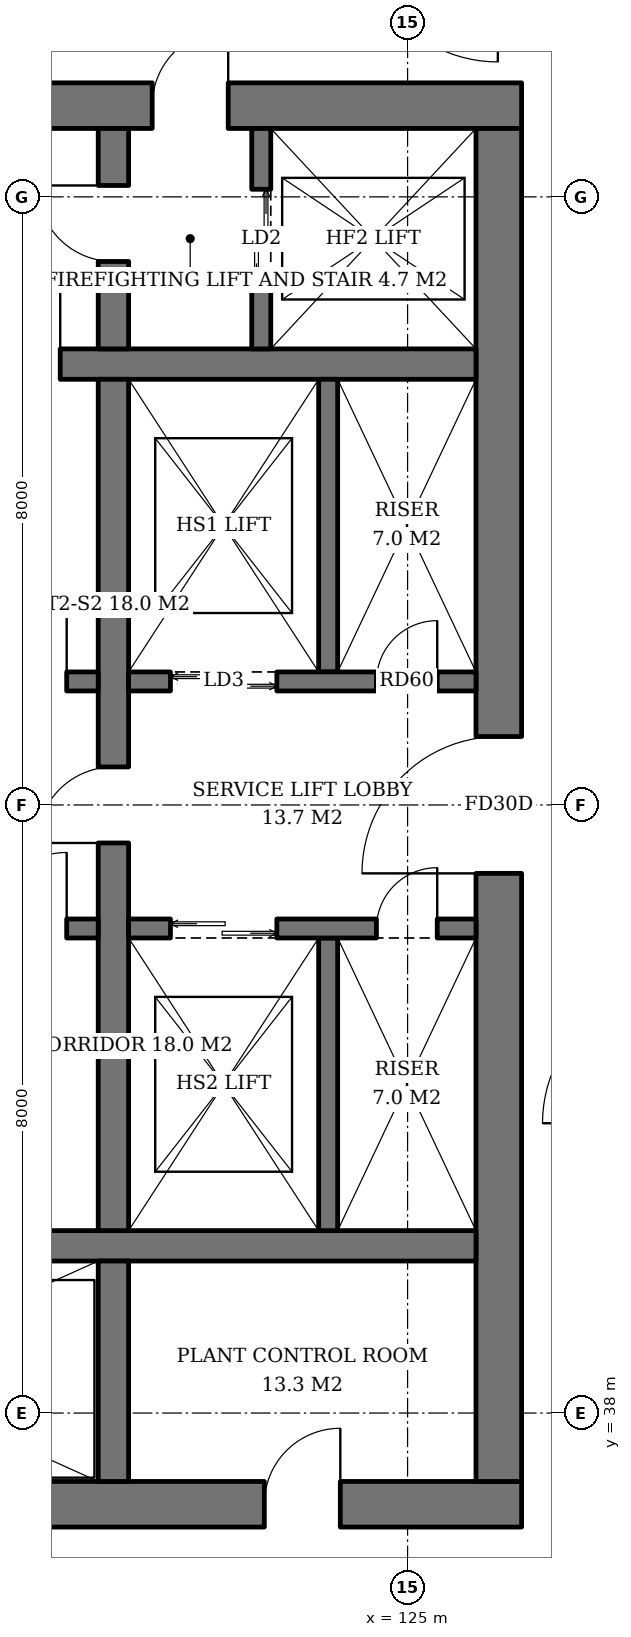
"""IFC4 building model, lengths in metres.
Left out: names, types, materials, properties, quantities, classifications, styles, units other than length and angle.
Written with IfcOpenShell. Run it as: python <this file> out.ifc"""

import sys

from ifc_helpers import new_model, si_unit, direction, frame, frame_2d, origin, place, context, subcontext, project, spatial, rectangle, extrude, element, fill, save


model = new_model("IFC4")
c1 = context("Model", 3, precision=1e-05, world=origin(), true_north=direction((0.0, 1.0)))
c2 = subcontext(c1, "Body", "Model", "MODEL_VIEW")
j1 = project(units=[si_unit("LENGTHUNIT", "METRE"), si_unit("PLANEANGLEUNIT", "RADIAN")], contexts=[c1])
p1 = place(None, origin())
s1 = spatial("IfcSite", under=j1, at=p1, CompositionType="ELEMENT")
p2 = place(p1, origin())
s2 = spatial("IfcBuilding", under=s1, at=p2, CompositionType="ELEMENT")
p3 = place(p2, frame((0.0, 0.0, 81.8)))
s3 = spatial("IfcBuildingStorey", under=s2, at=p3, CompositionType="ELEMENT", Elevation=81.8)
p4 = place(p3, frame((107.5, 36.8, 0.0), z_axis=(0.0, 0.0, 1.0), x_axis=(1.0, 0.0, 0.0)))
e1 = element("IfcWall", 1, at=p4, inside=s3, PredefinedType="SHEAR", context=c2, shape_type="SweptSolid", body=[
    extrude(rectangle(XDim=19.0, YDim=0.6, at=frame_2d((9.5, 0.0))), origin(), (0.0, 0.0, 1.0), 3.8),
])
p5 = place(p4, frame((3.9, 0.0, 0.0)))
e2 = element("IfcOpeningElement", 2, at=p5, cuts=e1, PredefinedType="OPENING", context=c2, shape_type="SweptSolid", body=[
    extrude(rectangle(XDim=1.0, YDim=2.1, at=frame_2d((0.5, 1.05))), frame((0.0, 0.31, 0.0), z_axis=(0.0, -1.0, 0.0), x_axis=(1.0, 0.0, 0.0)), (0.0, 0.0, 1.0), 0.62),
])
p6 = place(p4, frame((15.615, 0.0, 0.0)))
e3 = element("IfcOpeningElement", 3, at=p6, cuts=e1, PredefinedType="OPENING", context=c2, shape_type="SweptSolid", body=[
    extrude(rectangle(XDim=1.0, YDim=2.1, at=frame_2d((0.5, 1.05))), frame((0.0, 0.31, 0.0), z_axis=(0.0, -1.0, 0.0), x_axis=(1.0, 0.0, 0.0)), (0.0, 0.0, 1.0), 0.62),
])
p7 = place(p3, frame((107.5, 55.2, 0.0), z_axis=(0.0, 0.0, 1.0), x_axis=(1.0, 0.0, 0.0)))
e4 = element("IfcWall", 4, at=p7, inside=s3, PredefinedType="SHEAR", context=c2, shape_type="SweptSolid", body=[
    extrude(rectangle(XDim=19.0, YDim=0.6, at=frame_2d((9.5, 0.0))), origin(), (0.0, 0.0, 1.0), 3.8),
])
p8 = place(p7, frame((14.14, 0.0, 0.0)))
e5 = element("IfcOpeningElement", 5, at=p8, cuts=e4, PredefinedType="OPENING", context=c2, shape_type="SweptSolid", body=[
    extrude(rectangle(XDim=1.0, YDim=2.1, at=frame_2d((0.5, 1.05))), frame((0.0, 0.31, 0.0), z_axis=(0.0, -1.0, 0.0), x_axis=(1.0, 0.0, 0.0)), (0.0, 0.0, 1.0), 0.62),
])
p9 = place(p7, frame((1.675, 0.0, 0.0)))
e6 = element("IfcOpeningElement", 6, at=p9, cuts=e4, PredefinedType="OPENING", context=c2, shape_type="SweptSolid", body=[
    extrude(rectangle(XDim=1.0, YDim=2.1, at=frame_2d((0.5, 1.05))), frame((0.0, 0.31, 0.0), z_axis=(0.0, -1.0, 0.0), x_axis=(1.0, 0.0, 0.0)), (0.0, 0.0, 1.0), 0.62),
])
p10 = place(p7, frame((3.587, 0.0, 0.0)))
e7 = element("IfcOpeningElement", 7, at=p10, cuts=e4, PredefinedType="OPENING", context=c2, shape_type="SweptSolid", body=[
    extrude(rectangle(XDim=1.0, YDim=2.1, at=frame_2d((0.5, 1.05))), frame((0.0, 0.31, 0.0), z_axis=(0.0, -1.0, 0.0), x_axis=(1.0, 0.0, 0.0)), (0.0, 0.0, 1.0), 0.62),
])
p11 = place(p3, frame((126.2, 37.1, 0.0), z_axis=(0.0, 0.0, 1.0), x_axis=(0.0, 1.0, 0.0)))
e8 = element("IfcWall", 8, at=p11, inside=s3, PredefinedType="SHEAR", context=c2, shape_type="SweptSolid", body=[
    extrude(rectangle(XDim=17.8, YDim=0.6, at=frame_2d((8.9, 0.0))), origin(), (0.0, 0.0, 1.0), 3.8),
])
p12 = place(p11, frame((8.0, 0.0, 0.0)))
e9 = element("IfcOpeningElement", 9, at=p12, cuts=e8, PredefinedType="OPENING", context=c2, shape_type="SweptSolid", body=[
    extrude(rectangle(XDim=1.8, YDim=2.4, at=frame_2d((0.9, 1.2))), frame((0.0, 0.31, 0.0), z_axis=(0.0, -1.0, 0.0), x_axis=(1.0, 0.0, 0.0)), (0.0, 0.0, 1.0), 0.62),
])
p13 = place(p3, frame((108.1, 40.2, 0.0), z_axis=(0.0, 0.0, 1.0), x_axis=(1.0, 0.0, 0.0)))
e10 = element("IfcWall", 10, at=p13, inside=s3, PredefinedType="SHEAR", context=c2, shape_type="SweptSolid", body=[
    extrude(rectangle(XDim=17.8, YDim=0.4, at=frame_2d((8.9, 0.0))), origin(), (0.0, 0.0, 1.0), 3.8),
])
p14 = place(p13, frame((3.3, 0.0, 0.0)))
e11 = element("IfcOpeningElement", 11, at=p14, cuts=e10, PredefinedType="OPENING", context=c2, shape_type="SweptSolid", body=[
    extrude(rectangle(XDim=1.0, YDim=2.1, at=frame_2d((0.5, 1.05))), frame((0.0, 0.21, 0.0), z_axis=(0.0, -1.0, 0.0), x_axis=(1.0, 0.0, 0.0)), (0.0, 0.0, 1.0), 0.42),
])
p15 = place(p3, frame((108.1, 51.8, 0.0), z_axis=(0.0, 0.0, 1.0), x_axis=(1.0, 0.0, 0.0)))
e12 = element("IfcWall", 12, at=p15, inside=s3, PredefinedType="SHEAR", context=c2, shape_type="SweptSolid", body=[
    extrude(rectangle(XDim=17.8, YDim=0.4, at=frame_2d((8.9, 0.0))), origin(), (0.0, 0.0, 1.0), 3.8),
])
p16 = place(p15, frame((11.33, 0.0, 0.0)))
e13 = element("IfcOpeningElement", 13, at=p16, cuts=e12, PredefinedType="OPENING", context=c2, shape_type="SweptSolid", body=[
    extrude(rectangle(XDim=1.0, YDim=2.1, at=frame_2d((0.5, 1.05))), frame((0.0, 0.21, 0.0), z_axis=(0.0, -1.0, 0.0), x_axis=(1.0, 0.0, 0.0)), (0.0, 0.0, 1.0), 0.42),
])
p17 = place(p3, frame((121.13, 37.1, 0.0), z_axis=(0.0, 0.0, 1.0), x_axis=(0.0, 1.0, 0.0)))
e14 = element("IfcWall", 14, at=p17, inside=s3, PredefinedType="SHEAR", context=c2, shape_type="SweptSolid", body=[
    extrude(rectangle(XDim=2.9, YDim=0.4, at=frame_2d((1.45, 0.0))), origin(), (0.0, 0.0, 1.0), 3.8),
])
p18 = place(p3, frame((121.13, 40.4, 0.0), z_axis=(0.0, 0.0, 1.0), x_axis=(0.0, 1.0, 0.0)))
e15 = element("IfcWall", 15, at=p18, inside=s3, PredefinedType="SHEAR", context=c2, shape_type="SweptSolid", body=[
    extrude(rectangle(XDim=11.2, YDim=0.4, at=frame_2d((5.6, 0.0))), origin(), (0.0, 0.0, 1.0), 3.8),
])
p19 = place(p18, frame((5.1, 0.0, 0.0)))
e16 = element("IfcOpeningElement", 16, at=p19, cuts=e15, PredefinedType="OPENING", context=c2, shape_type="SweptSolid", body=[
    extrude(rectangle(XDim=1.0, YDim=2.1, at=frame_2d((0.5, 1.05))), frame((0.0, 0.21, 0.0), z_axis=(0.0, -1.0, 0.0), x_axis=(1.0, 0.0, 0.0)), (0.0, 0.0, 1.0), 0.42),
])
p20 = place(p3, frame((121.13, 52.0, 0.0), z_axis=(0.0, 0.0, 1.0), x_axis=(0.0, 1.0, 0.0)))
e17 = element("IfcWall", 17, at=p20, inside=s3, PredefinedType="SHEAR", context=c2, shape_type="SweptSolid", body=[
    extrude(rectangle(XDim=2.9, YDim=0.4, at=frame_2d((1.45, 0.0))), origin(), (0.0, 0.0, 1.0), 3.8),
])
p21 = place(p20, frame((1.15, 0.0, 0.0)))
e18 = element("IfcOpeningElement", 18, at=p21, cuts=e17, PredefinedType="OPENING", context=c2, shape_type="SweptSolid", body=[
    extrude(rectangle(XDim=1.0, YDim=2.1, at=frame_2d((0.5, 1.05))), frame((0.0, 0.21, 0.0), z_axis=(0.0, -1.0, 0.0), x_axis=(1.0, 0.0, 0.0)), (0.0, 0.0, 1.0), 0.42),
])
p22 = place(p3, frame((123.075, 52.0, 0.0), z_axis=(0.0, 0.0, 1.0), x_axis=(0.0, 1.0, 0.0)))
e19 = element("IfcWall", 19, at=p22, inside=s3, PredefinedType="SHEAR", context=c2, shape_type="SweptSolid", body=[
    extrude(rectangle(XDim=2.9, YDim=0.25, at=frame_2d((1.45, 0.0))), origin(), (0.0, 0.0, 1.0), 3.8),
])
p23 = place(p22, frame((0.8, 0.0, 0.0)))
e20 = element("IfcOpeningElement", 20, at=p23, cuts=e19, PredefinedType="OPENING", context=c2, shape_type="SweptSolid", body=[
    extrude(rectangle(XDim=1.3, YDim=2.2, at=frame_2d((0.65, 1.1))), frame((0.0, 0.135, 0.0), z_axis=(0.0, -1.0, 0.0), x_axis=(1.0, 0.0, 0.0)), (0.0, 0.0, 1.0), 0.27),
])
p24 = place(p3, frame((108.1, 47.625, 0.0), z_axis=(0.0, 0.0, 1.0), x_axis=(1.0, 0.0, 0.0)))
e21 = element("IfcWall", 21, at=p24, inside=s3, PredefinedType="SHEAR", context=c2, shape_type="SweptSolid", body=[
    extrude(rectangle(XDim=12.83, YDim=0.25, at=frame_2d((6.415, 0.0))), origin(), (0.0, 0.0, 1.0), 3.8),
])
p25 = place(p24, frame((0.7, 0.0, 0.0)))
e22 = element("IfcOpeningElement", 22, at=p25, cuts=e21, PredefinedType="OPENING", context=c2, shape_type="SweptSolid", body=[
    extrude(rectangle(XDim=1.1, YDim=2.2, at=frame_2d((0.55, 1.1))), frame((0.0, 0.135, 0.0), z_axis=(0.0, -1.0, 0.0), x_axis=(1.0, 0.0, 0.0)), (0.0, 0.0, 1.0), 0.27),
])
p26 = place(p24, frame((3.45, 0.0, 0.0)))
e23 = element("IfcOpeningElement", 23, at=p26, cuts=e21, PredefinedType="OPENING", context=c2, shape_type="SweptSolid", body=[
    extrude(rectangle(XDim=1.1, YDim=2.2, at=frame_2d((0.55, 1.1))), frame((0.0, 0.135, 0.0), z_axis=(0.0, -1.0, 0.0), x_axis=(1.0, 0.0, 0.0)), (0.0, 0.0, 1.0), 0.27),
])
p27 = place(p24, frame((6.2, 0.0, 0.0)))
e24 = element("IfcOpeningElement", 24, at=p27, cuts=e21, PredefinedType="OPENING", context=c2, shape_type="SweptSolid", body=[
    extrude(rectangle(XDim=1.1, YDim=2.2, at=frame_2d((0.55, 1.1))), frame((0.0, 0.135, 0.0), z_axis=(0.0, -1.0, 0.0), x_axis=(1.0, 0.0, 0.0)), (0.0, 0.0, 1.0), 0.27),
])
p28 = place(p24, frame((8.95, 0.0, 0.0)))
e25 = element("IfcOpeningElement", 25, at=p28, cuts=e21, PredefinedType="OPENING", context=c2, shape_type="SweptSolid", body=[
    extrude(rectangle(XDim=1.1, YDim=2.2, at=frame_2d((0.55, 1.1))), frame((0.0, 0.135, 0.0), z_axis=(0.0, -1.0, 0.0), x_axis=(1.0, 0.0, 0.0)), (0.0, 0.0, 1.0), 0.27),
])
p29 = place(p24, frame((11.415, 0.0, 0.0)))
e26 = element("IfcOpeningElement", 26, at=p29, cuts=e21, PredefinedType="OPENING", context=c2, shape_type="SweptSolid", body=[
    extrude(rectangle(XDim=1.0, YDim=2.1, at=frame_2d((0.5, 1.05))), frame((0.0, 0.135, 0.0), z_axis=(0.0, -1.0, 0.0), x_axis=(1.0, 0.0, 0.0)), (0.0, 0.0, 1.0), 0.27),
])
p30 = place(p3, frame((108.1, 44.375, 0.0), z_axis=(0.0, 0.0, 1.0), x_axis=(1.0, 0.0, 0.0)))
e27 = element("IfcWall", 27, at=p30, inside=s3, PredefinedType="SHEAR", context=c2, shape_type="SweptSolid", body=[
    extrude(rectangle(XDim=12.83, YDim=0.25, at=frame_2d((6.415, 0.0))), origin(), (0.0, 0.0, 1.0), 3.8),
])
p31 = place(p30, frame((0.7, 0.0, 0.0)))
e28 = element("IfcOpeningElement", 28, at=p31, cuts=e27, PredefinedType="OPENING", context=c2, shape_type="SweptSolid", body=[
    extrude(rectangle(XDim=1.1, YDim=2.2, at=frame_2d((0.55, 1.1))), frame((0.0, 0.135, 0.0), z_axis=(0.0, -1.0, 0.0), x_axis=(1.0, 0.0, 0.0)), (0.0, 0.0, 1.0), 0.27),
])
p32 = place(p30, frame((3.45, 0.0, 0.0)))
e29 = element("IfcOpeningElement", 29, at=p32, cuts=e27, PredefinedType="OPENING", context=c2, shape_type="SweptSolid", body=[
    extrude(rectangle(XDim=1.1, YDim=2.2, at=frame_2d((0.55, 1.1))), frame((0.0, 0.135, 0.0), z_axis=(0.0, -1.0, 0.0), x_axis=(1.0, 0.0, 0.0)), (0.0, 0.0, 1.0), 0.27),
])
p33 = place(p30, frame((6.2, 0.0, 0.0)))
e30 = element("IfcOpeningElement", 30, at=p33, cuts=e27, PredefinedType="OPENING", context=c2, shape_type="SweptSolid", body=[
    extrude(rectangle(XDim=1.1, YDim=2.2, at=frame_2d((0.55, 1.1))), frame((0.0, 0.135, 0.0), z_axis=(0.0, -1.0, 0.0), x_axis=(1.0, 0.0, 0.0)), (0.0, 0.0, 1.0), 0.27),
])
p34 = place(p30, frame((9.0, 0.0, 0.0)))
e31 = element("IfcOpeningElement", 31, at=p34, cuts=e27, PredefinedType="OPENING", context=c2, shape_type="SweptSolid", body=[
    extrude(rectangle(XDim=1.0, YDim=2.1, at=frame_2d((0.5, 1.05))), frame((0.0, 0.135, 0.0), z_axis=(0.0, -1.0, 0.0), x_axis=(1.0, 0.0, 0.0)), (0.0, 0.0, 1.0), 0.27),
])
p35 = place(p30, frame((11.415, 0.0, 0.0)))
e32 = element("IfcOpeningElement", 32, at=p35, cuts=e27, PredefinedType="OPENING", context=c2, shape_type="SweptSolid", body=[
    extrude(rectangle(XDim=1.0, YDim=2.1, at=frame_2d((0.5, 1.05))), frame((0.0, 0.135, 0.0), z_axis=(0.0, -1.0, 0.0), x_axis=(1.0, 0.0, 0.0)), (0.0, 0.0, 1.0), 0.27),
])
p36 = place(p3, frame((123.955, 47.75, 0.0), z_axis=(0.0, 0.0, 1.0), x_axis=(0.0, 1.0, 0.0)))
e33 = element("IfcWall", 33, at=p36, inside=s3, PredefinedType="SHEAR", context=c2, shape_type="SweptSolid", body=[
    extrude(rectangle(XDim=3.85, YDim=0.25, at=frame_2d((1.925, 0.0))), origin(), (0.0, 0.0, 1.0), 3.8),
])
p37 = place(p3, frame((121.33, 47.625, 0.0), z_axis=(0.0, 0.0, 1.0), x_axis=(1.0, 0.0, 0.0)))
e34 = element("IfcWall", 34, at=p37, inside=s3, PredefinedType="SHEAR", context=c2, shape_type="SweptSolid", body=[
    extrude(rectangle(XDim=4.57, YDim=0.25, at=frame_2d((2.285, 0.0))), origin(), (0.0, 0.0, 1.0), 3.8),
])
p38 = place(p37, frame((0.55, 0.0, 0.0)))
e35 = element("IfcOpeningElement", 35, at=p38, cuts=e34, PredefinedType="OPENING", context=c2, shape_type="SweptSolid", body=[
    extrude(rectangle(XDim=1.4, YDim=2.4, at=frame_2d((0.7, 1.2))), frame((0.0, 0.135, 0.0), z_axis=(0.0, -1.0, 0.0), x_axis=(1.0, 0.0, 0.0)), (0.0, 0.0, 1.0), 0.27),
])
p39 = place(p37, frame((3.26, 0.0, 0.0)))
e36 = element("IfcOpeningElement", 36, at=p39, cuts=e34, PredefinedType="OPENING", context=c2, shape_type="SweptSolid", body=[
    extrude(rectangle(XDim=0.8, YDim=2.0, at=frame_2d((0.4, 1.0))), frame((0.0, 0.135, 0.0), z_axis=(0.0, -1.0, 0.0), x_axis=(1.0, 0.0, 0.0)), (0.0, 0.0, 1.0), 0.27),
])
p40 = place(p3, frame((123.955, 44.25, 0.0), z_axis=(0.0, 0.0, 1.0), x_axis=(0.0, -1.0, 0.0)))
e37 = element("IfcWall", 37, at=p40, inside=s3, PredefinedType="SHEAR", context=c2, shape_type="SweptSolid", body=[
    extrude(rectangle(XDim=3.85, YDim=0.25, at=frame_2d((1.925, 0.0))), origin(), (0.0, 0.0, 1.0), 3.8),
])
p41 = place(p3, frame((121.33, 44.375, 0.0), z_axis=(0.0, 0.0, 1.0), x_axis=(1.0, 0.0, 0.0)))
e38 = element("IfcWall", 38, at=p41, inside=s3, PredefinedType="SHEAR", context=c2, shape_type="SweptSolid", body=[
    extrude(rectangle(XDim=4.57, YDim=0.25, at=frame_2d((2.285, 0.0))), origin(), (0.0, 0.0, 1.0), 3.8),
])
p42 = place(p41, frame((0.55, 0.0, 0.0)))
e39 = element("IfcOpeningElement", 39, at=p42, cuts=e38, PredefinedType="OPENING", context=c2, shape_type="SweptSolid", body=[
    extrude(rectangle(XDim=1.4, YDim=2.4, at=frame_2d((0.7, 1.2))), frame((0.0, 0.135, 0.0), z_axis=(0.0, -1.0, 0.0), x_axis=(1.0, 0.0, 0.0)), (0.0, 0.0, 1.0), 0.27),
])
p43 = place(p41, frame((3.26, 0.0, 0.0)))
e40 = element("IfcOpeningElement", 40, at=p43, cuts=e38, PredefinedType="OPENING", context=c2, shape_type="SweptSolid", body=[
    extrude(rectangle(XDim=0.8, YDim=2.0, at=frame_2d((0.4, 1.0))), frame((0.0, 0.135, 0.0), z_axis=(0.0, -1.0, 0.0), x_axis=(1.0, 0.0, 0.0)), (0.0, 0.0, 1.0), 0.27),
])
p44 = place(p23, origin())
e41 = element("IfcDoor", 41, at=p44, inside=s3, OperationType="DOUBLE_DOOR_SLIDING", PredefinedType="DOOR", context=c2, shape_type="SweptSolid", body=[
    extrude(rectangle(XDim=1.3, YDim=2.2, at=frame_2d((0.65, 1.1))), frame((0.0, 0.025, 0.0), z_axis=(0.0, -1.0, 0.0), x_axis=(1.0, 0.0, 0.0)), (0.0, 0.0, 1.0), 0.05),
])
fill(e20, e41)
p45 = place(p29, origin())
e42 = element("IfcDoor", 42, at=p45, inside=s3, OperationType="SINGLE_SWING_RIGHT", PredefinedType="DOOR", context=c2, shape_type="SweptSolid", body=[
    extrude(rectangle(XDim=1.0, YDim=2.1, at=frame_2d((0.5, 1.05))), frame((0.0, 0.025, 0.0), z_axis=(0.0, -1.0, 0.0), x_axis=(1.0, 0.0, 0.0)), (0.0, 0.0, 1.0), 0.05),
])
fill(e26, e42)
p46 = place(p35, origin())
e43 = element("IfcDoor", 43, at=p46, inside=s3, OperationType="SINGLE_SWING_RIGHT", PredefinedType="DOOR", context=c2, shape_type="SweptSolid", body=[
    extrude(rectangle(XDim=1.0, YDim=2.1, at=frame_2d((0.5, 1.05))), frame((0.0, 0.025, 0.0), z_axis=(0.0, -1.0, 0.0), x_axis=(1.0, 0.0, 0.0)), (0.0, 0.0, 1.0), 0.05),
])
fill(e32, e43)
p47 = place(p38, origin())
e44 = element("IfcDoor", 44, at=p47, inside=s3, OperationType="DOUBLE_DOOR_SLIDING", PredefinedType="DOOR", context=c2, shape_type="SweptSolid", body=[
    extrude(rectangle(XDim=1.4, YDim=2.4, at=frame_2d((0.7, 1.2))), frame((0.0, 0.025, 0.0), z_axis=(0.0, -1.0, 0.0), x_axis=(1.0, 0.0, 0.0)), (0.0, 0.0, 1.0), 0.05),
])
fill(e35, e44)
p48 = place(p39, origin())
e45 = element("IfcDoor", 45, at=p48, inside=s3, OperationType="SINGLE_SWING_RIGHT", PredefinedType="DOOR", context=c2, shape_type="SweptSolid", body=[
    extrude(rectangle(XDim=0.8, YDim=2.0, at=frame_2d((0.4, 1.0))), frame((0.0, 0.025, 0.0), z_axis=(0.0, -1.0, 0.0), x_axis=(1.0, 0.0, 0.0)), (0.0, 0.0, 1.0), 0.05),
])
fill(e36, e45)
p49 = place(p42, origin())
e46 = element("IfcDoor", 46, at=p49, inside=s3, OperationType="DOUBLE_DOOR_SLIDING", PredefinedType="DOOR", context=c2, shape_type="SweptSolid", body=[
    extrude(rectangle(XDim=1.4, YDim=2.4, at=frame_2d((0.7, 1.2))), frame((0.0, 0.025, 0.0), z_axis=(0.0, -1.0, 0.0), x_axis=(1.0, 0.0, 0.0)), (0.0, 0.0, 1.0), 0.05),
])
fill(e39, e46)
p50 = place(p43, origin())
e47 = element("IfcDoor", 47, at=p50, inside=s3, OperationType="SINGLE_SWING_RIGHT", PredefinedType="DOOR", context=c2, shape_type="SweptSolid", body=[
    extrude(rectangle(XDim=0.8, YDim=2.0, at=frame_2d((0.4, 1.0))), frame((0.0, 0.025, 0.0), z_axis=(0.0, -1.0, 0.0), x_axis=(1.0, 0.0, 0.0)), (0.0, 0.0, 1.0), 0.05),
])
fill(e40, e47)
p51 = place(p19, origin())
e48 = element("IfcDoor", 48, at=p51, inside=s3, OperationType="SINGLE_SWING_LEFT", PredefinedType="DOOR", context=c2, shape_type="SweptSolid", body=[
    extrude(rectangle(XDim=1.0, YDim=2.1, at=frame_2d((0.5, 1.05))), frame((0.0, 0.025, 0.0), z_axis=(0.0, -1.0, 0.0), x_axis=(1.0, 0.0, 0.0)), (0.0, 0.0, 1.0), 0.05),
])
fill(e16, e48)
p52 = place(p21, origin())
e49 = element("IfcDoor", 49, at=p52, inside=s3, OperationType="SINGLE_SWING_RIGHT", PredefinedType="DOOR", context=c2, shape_type="SweptSolid", body=[
    extrude(rectangle(XDim=1.0, YDim=2.1, at=frame_2d((0.5, 1.05))), frame((0.0, 0.025, 0.0), z_axis=(0.0, -1.0, 0.0), x_axis=(1.0, 0.0, 0.0)), (0.0, 0.0, 1.0), 0.05),
])
fill(e18, e49)
p53 = place(p8, origin())
e50 = element("IfcDoor", 50, at=p53, inside=s3, OperationType="SINGLE_SWING_RIGHT", PredefinedType="DOOR", context=c2, shape_type="SweptSolid", body=[
    extrude(rectangle(XDim=1.0, YDim=2.1, at=frame_2d((0.5, 1.05))), frame((0.0, 0.025, 0.0), z_axis=(0.0, -1.0, 0.0), x_axis=(1.0, 0.0, 0.0)), (0.0, 0.0, 1.0), 0.05),
])
fill(e5, e50)
p54 = place(p12, origin())
e51 = element("IfcDoor", 51, at=p54, inside=s3, OperationType="DOUBLE_DOOR_SINGLE_SWING", PredefinedType="DOOR", context=c2, shape_type="SweptSolid", body=[
    extrude(rectangle(XDim=1.8, YDim=2.4, at=frame_2d((0.9, 1.2))), frame((0.0, 0.025, 0.0), z_axis=(0.0, -1.0, 0.0), x_axis=(1.0, 0.0, 0.0)), (0.0, 0.0, 1.0), 0.05),
])
fill(e9, e51)
p55 = place(p16, origin())
e52 = element("IfcDoor", 52, at=p55, inside=s3, OperationType="SINGLE_SWING_RIGHT", PredefinedType="DOOR", context=c2, shape_type="SweptSolid", body=[
    extrude(rectangle(XDim=1.0, YDim=2.1, at=frame_2d((0.5, 1.05))), frame((0.0, 0.025, 0.0), z_axis=(0.0, -1.0, 0.0), x_axis=(1.0, 0.0, 0.0)), (0.0, 0.0, 1.0), 0.05),
])
fill(e13, e52)
p56 = place(p6, origin())
e53 = element("IfcDoor", 53, at=p56, inside=s3, OperationType="SINGLE_SWING_RIGHT", PredefinedType="DOOR", context=c2, shape_type="SweptSolid", body=[
    extrude(rectangle(XDim=1.0, YDim=2.1, at=frame_2d((0.5, 1.05))), frame((0.0, 0.29, 0.0), z_axis=(0.0, -1.0, 0.0), x_axis=(1.0, 0.0, 0.0)), (0.0, 0.0, 1.0), 0.05),
])
fill(e3, e53)
save(model, sys.argv[1])
